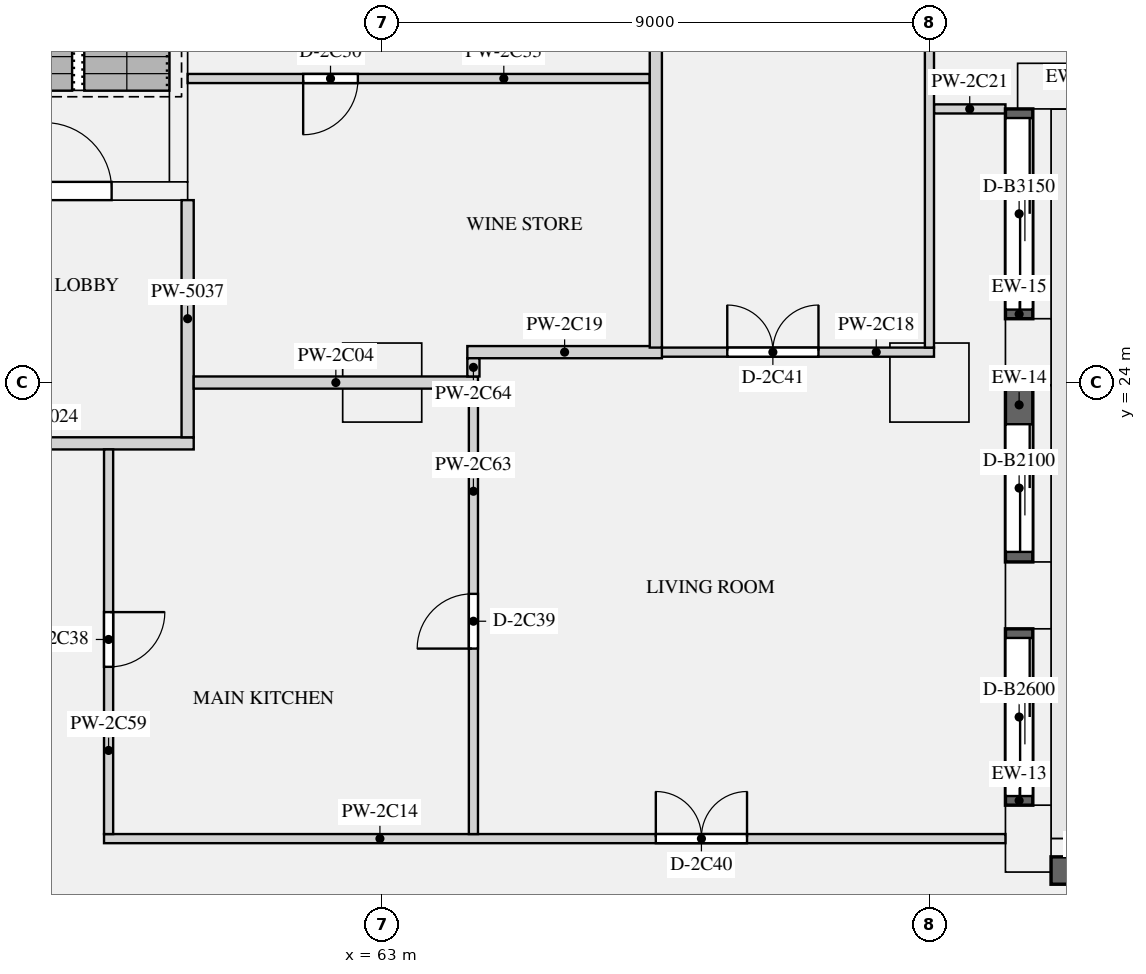
"""IFC4 building model, lengths in metres.
Left out: names, types, materials, properties, quantities, classifications, styles, units other than length and angle.
Written with IfcOpenShell. Run it as: python <this file> out.ifc"""

import sys

from ifc_helpers import new_model, si_unit, direction, frame, frame_2d, origin, origin_2d, place, context, subcontext, project, spatial, rectangle, extrude, element, fill, save


model = new_model("IFC4")
c1 = context("Model", 3, precision=1e-05, world=origin(), true_north=direction((0.0, 1.0)))
c2 = subcontext(c1, "Body", "Model", "MODEL_VIEW")
j1 = project(units=[si_unit("LENGTHUNIT", "METRE"), si_unit("PLANEANGLEUNIT", "RADIAN")], contexts=[c1])
p1 = place(None, origin())
s1 = spatial("IfcSite", under=j1, at=p1, CompositionType="ELEMENT")
p2 = place(p1, origin())
s2 = spatial("IfcBuilding", under=s1, at=p2, CompositionType="ELEMENT")
p3 = place(p2, frame((0.0, 0.0, 102.45)))
s3 = spatial("IfcBuildingStorey", under=s2, at=p3, CompositionType="ELEMENT", Elevation=102.45)
for number, where, z_axis, x_axis in (
    (1, (73.625, 16.5, 0.0), (0.0, 0.0, 1.0), (0.0, 1.0, 0.0)),
    (2, (73.625, 20.5, 0.0), (0.0, 0.0, 1.0), (0.0, 1.0, 0.0)),
    (3, (73.625, 24.5, 0.0), (0.0, 0.0, 1.0), (0.0, 1.0, 0.0)),
    (4, (74.0, 28.875, 0.0), (0.0, 0.0, 1.0), (1.0, 0.0, 0.0)),
):
    element("IfcColumn", number, at=place(p3, frame(where, z_axis=z_axis, x_axis=x_axis)), inside=s3, PredefinedType="USERDEFINED", context=c2, shape_type="SweptSolid", body=[
        extrude(rectangle(XDim=1.1, YDim=0.75, at=origin_2d()), origin(), (0.0, 0.0, 1.0), 3.15),
    ])
for number, where, z_axis, x_axis in (
    (5, (63.0, 24.0, 0.0), (0.0, 0.0, 1.0), (1.0, 0.0, 0.0)),
    (6, (72.0, 24.0, 0.0), (0.0, 0.0, 1.0), (1.0, 0.0, 0.0)),
):
    element("IfcColumn", number, at=place(p3, frame(where, z_axis=z_axis, x_axis=x_axis)), inside=s3, PredefinedType="COLUMN", context=c2, shape_type="SweptSolid", body=[
        extrude(rectangle(XDim=1.3, YDim=1.3, at=origin_2d()), origin(), (0.0, 0.0, 1.0), 3.15),
    ])
p4 = place(p3, frame((56.2, 27.15, 0.0), z_axis=(0.0, 0.0, 1.0), x_axis=(1.0, 0.0, 0.0)))
e7 = element("IfcWall", 7, at=p4, inside=s3, PredefinedType="SHEAR", context=c2, shape_type="SweptSolid", body=[
    extrude(rectangle(XDim=3.6, YDim=0.3, at=frame_2d((1.8, 0.0))), origin(), (0.0, 0.0, 1.0), 3.15),
])
p5 = place(p4, frame((1.25, 0.0, 0.0)))
e8 = element("IfcOpeningElement", 8, at=p5, cuts=e7, PredefinedType="OPENING", context=c2, shape_type="SweptSolid", body=[
    extrude(rectangle(XDim=1.1, YDim=2.1, at=frame_2d((0.55, 1.05))), frame((0.0, 0.16, 0.0), z_axis=(0.0, -1.0, 0.0), x_axis=(1.0, 0.0, 0.0)), (0.0, 0.0, 1.0), 0.32),
])
p6 = place(p3, frame((59.65, 27.3, 0.0), z_axis=(0.0, 0.0, 1.0), x_axis=(0.0, 1.0, 0.0)))
e9 = element("IfcWall", 9, at=p6, inside=s3, PredefinedType="SHEAR", context=c2, shape_type="SweptSolid", body=[
    extrude(rectangle(XDim=7.8, YDim=0.3, at=frame_2d((3.9, 0.0))), origin(), (0.0, 0.0, 1.0), 3.15),
])
p7 = place(p3, frame((75.4, 15.975, 0.9), z_axis=(0.0, 0.0, 1.0), x_axis=(-1.0, 0.0, 0.0)))
e10 = element("IfcWall", 10, at=p7, inside=s3, PredefinedType="SOLIDWALL", context=c2, shape_type="SweptSolid", body=[
    extrude(rectangle(XDim=1.4, YDim=0.45, at=frame_2d((0.7, 0.0))), origin(), (0.0, 0.0, 1.0), 1.93),
])
p8 = place(p3, frame((73.475, 17.05, 0.0), z_axis=(0.0, 0.0, 1.0), x_axis=(0.0, 1.0, 0.0)))
e11 = element("IfcWall", 11, at=p8, inside=s3, PredefinedType="SOLIDWALL", context=c2, shape_type="SweptSolid", body=[
    extrude(rectangle(XDim=2.9, YDim=0.45, at=frame_2d((1.45, 0.0))), origin(), (0.0, 0.0, 1.0), 2.83),
])
p9 = place(p8, frame((0.15, 0.0, 0.0)))
e12 = element("IfcOpeningElement", 12, at=p9, cuts=e11, PredefinedType="OPENING", context=c2, shape_type="SweptSolid", body=[
    extrude(rectangle(XDim=2.6, YDim=2.3, at=frame_2d((1.3, 1.15))), frame((0.0, 0.235, 0.0), z_axis=(0.0, -1.0, 0.0), x_axis=(1.0, 0.0, 0.0)), (0.0, 0.0, 1.0), 0.47),
])
p10 = place(p3, frame((73.475, 21.05, 0.0), z_axis=(0.0, 0.0, 1.0), x_axis=(0.0, 1.0, 0.0)))
e13 = element("IfcWall", 13, at=p10, inside=s3, PredefinedType="SOLIDWALL", context=c2, shape_type="SweptSolid", body=[
    extrude(rectangle(XDim=2.9, YDim=0.45, at=frame_2d((1.45, 0.0))), origin(), (0.0, 0.0, 1.0), 2.83),
])
p11 = place(p10, frame((0.165, 0.0, 0.0)))
e14 = element("IfcOpeningElement", 14, at=p11, cuts=e13, PredefinedType="OPENING", context=c2, shape_type="SweptSolid", body=[
    extrude(rectangle(XDim=2.1, YDim=2.3, at=frame_2d((1.05, 1.15))), frame((0.0, 0.235, 0.0), z_axis=(0.0, -1.0, 0.0), x_axis=(1.0, 0.0, 0.0)), (0.0, 0.0, 1.0), 0.47),
])
p12 = place(p3, frame((73.475, 25.05, 0.0), z_axis=(0.0, 0.0, 1.0), x_axis=(0.0, 1.0, 0.0)))
e15 = element("IfcWall", 15, at=p12, inside=s3, PredefinedType="SOLIDWALL", context=c2, shape_type="SweptSolid", body=[
    extrude(rectangle(XDim=3.45, YDim=0.45, at=frame_2d((1.725, 0.0))), origin(), (0.0, 0.0, 1.0), 2.83),
])
p13 = place(p12, frame((0.15, 0.0, 0.0)))
e16 = element("IfcOpeningElement", 16, at=p13, cuts=e15, PredefinedType="OPENING", context=c2, shape_type="SweptSolid", body=[
    extrude(rectangle(XDim=3.15, YDim=2.3, at=frame_2d((1.575, 1.15))), frame((0.0, 0.235, 0.0), z_axis=(0.0, -1.0, 0.0), x_axis=(1.0, 0.0, 0.0)), (0.0, 0.0, 1.0), 0.47),
])
p14 = place(p3, frame((54.9, 23.0, 0.0), z_axis=(0.0, 0.0, 1.0), x_axis=(1.0, 0.0, 0.0)))
e17 = element("IfcWall", 17, at=p14, inside=s3, PredefinedType="PARTITIONING", context=c2, shape_type="SweptSolid", body=[
    extrude(rectangle(XDim=5.0, YDim=0.2, at=frame_2d((2.5, 0.0))), origin(), (0.0, 0.0, 1.0), 2.83),
])
p15 = place(p3, frame((59.8, 23.1, 0.0), z_axis=(0.0, 0.0, 1.0), x_axis=(0.0, 1.0, 0.0)))
e18 = element("IfcWall", 18, at=p15, inside=s3, PredefinedType="PARTITIONING", context=c2, shape_type="SweptSolid", body=[
    extrude(rectangle(XDim=3.9, YDim=0.2, at=frame_2d((1.95, 0.0))), origin(), (0.0, 0.0, 1.0), 2.83),
])
p16 = place(p3, frame((59.9, 24.0, 0.0), z_axis=(0.0, 0.0, 1.0), x_axis=(1.0, 0.0, 0.0)))
e19 = element("IfcWall", 19, at=p16, inside=s3, PredefinedType="PARTITIONING", context=c2, shape_type="SweptSolid", body=[
    extrude(rectangle(XDim=4.675, YDim=0.2, at=frame_2d((2.337, 0.0))), origin(), (0.0, 0.0, 1.0), 2.83),
])
p17 = place(p3, frame((58.425, 16.5, 0.0), z_axis=(0.0, 0.0, 1.0), x_axis=(1.0, 0.0, 0.0)))
e20 = element("IfcWall", 20, at=p17, inside=s3, PredefinedType="PARTITIONING", context=c2, shape_type="SweptSolid", body=[
    extrude(rectangle(XDim=14.825, YDim=0.15, at=frame_2d((7.413, 0.0))), origin(), (0.0, 0.0, 1.0), 2.83),
])
p18 = place(p17, frame((9.075, 0.0, 0.0)))
e21 = element("IfcOpeningElement", 21, at=p18, cuts=e20, PredefinedType="OPENING", context=c2, shape_type="SweptSolid", body=[
    extrude(rectangle(XDim=1.5, YDim=2.1, at=frame_2d((0.75, 1.05))), frame((0.0, 0.085, 0.0), z_axis=(0.0, -1.0, 0.0), x_axis=(1.0, 0.0, 0.0)), (0.0, 0.0, 1.0), 0.17),
])
p19 = place(p3, frame((67.4, 24.5, 0.0), z_axis=(0.0, 0.0, 1.0), x_axis=(1.0, 0.0, 0.0)))
e22 = element("IfcWall", 22, at=p19, inside=s3, PredefinedType="PARTITIONING", context=c2, shape_type="SweptSolid", body=[
    extrude(rectangle(XDim=4.675, YDim=0.15, at=frame_2d((2.337, 0.0))), origin(), (0.0, 0.0, 1.0), 2.83),
])
p20 = place(p19, frame((1.275, 0.0, 0.0)))
e23 = element("IfcOpeningElement", 23, at=p20, cuts=e22, PredefinedType="OPENING", context=c2, shape_type="SweptSolid", body=[
    extrude(rectangle(XDim=1.5, YDim=2.1, at=frame_2d((0.75, 1.05))), frame((0.0, 0.085, 0.0), z_axis=(0.0, -1.0, 0.0), x_axis=(1.0, 0.0, 0.0)), (0.0, 0.0, 1.0), 0.17),
])
p21 = place(p3, frame((64.4, 24.5, 0.0), z_axis=(0.0, 0.0, 1.0), x_axis=(1.0, 0.0, 0.0)))
e24 = element("IfcWall", 24, at=p21, inside=s3, PredefinedType="PARTITIONING", context=c2, shape_type="SweptSolid", body=[
    extrude(rectangle(XDim=3.2, YDim=0.2, at=frame_2d((1.6, 0.0))), origin(), (0.0, 0.0, 1.0), 2.83),
])
p22 = place(p3, frame((72.075, 28.5, 0.0), z_axis=(0.0, 0.0, 1.0), x_axis=(1.0, 0.0, 0.0)))
e25 = element("IfcWall", 25, at=p22, inside=s3, PredefinedType="PARTITIONING", context=c2, shape_type="SweptSolid", body=[
    extrude(rectangle(XDim=1.175, YDim=0.15, at=frame_2d((0.587, 0.0))), origin(), (0.0, 0.0, 1.0), 2.83),
])
p23 = place(p3, frame((59.8, 29.0, 0.0), z_axis=(0.0, 0.0, 1.0), x_axis=(1.0, 0.0, 0.0)))
e26 = element("IfcWall", 26, at=p23, inside=s3, PredefinedType="PARTITIONING", context=c2, shape_type="SweptSolid", body=[
    extrude(rectangle(XDim=7.6, YDim=0.15, at=frame_2d((3.8, 0.0))), origin(), (0.0, 0.0, 1.0), 2.83),
])
p24 = place(p23, frame((1.9, 0.0, 0.0)))
e27 = element("IfcOpeningElement", 27, at=p24, cuts=e26, PredefinedType="OPENING", context=c2, shape_type="SweptSolid", body=[
    extrude(rectangle(XDim=0.9, YDim=2.1, at=frame_2d((0.45, 1.05))), frame((0.0, 0.085, 0.0), z_axis=(0.0, -1.0, 0.0), x_axis=(1.0, 0.0, 0.0)), (0.0, 0.0, 1.0), 0.17),
])
p25 = place(p3, frame((67.5, 24.575, 0.0), z_axis=(0.0, 0.0, 1.0), x_axis=(0.0, 1.0, 0.0)))
e28 = element("IfcWall", 28, at=p25, inside=s3, PredefinedType="PARTITIONING", context=c2, shape_type="SweptSolid", body=[
    extrude(rectangle(XDim=20.175, YDim=0.2, at=frame_2d((10.087, 0.0))), origin(), (0.0, 0.0, 1.0), 2.83),
])
p26 = place(p3, frame((58.5, 16.575, 0.0), z_axis=(0.0, 0.0, 1.0), x_axis=(0.0, 1.0, 0.0)))
e29 = element("IfcWall", 29, at=p26, inside=s3, PredefinedType="PARTITIONING", context=c2, shape_type="SweptSolid", body=[
    extrude(rectangle(XDim=6.325, YDim=0.15, at=frame_2d((3.163, 0.0))), origin(), (0.0, 0.0, 1.0), 2.83),
])
p27 = place(p26, frame((2.75, 0.0, 0.0)))
e30 = element("IfcOpeningElement", 30, at=p27, cuts=e29, PredefinedType="OPENING", context=c2, shape_type="SweptSolid", body=[
    extrude(rectangle(XDim=0.9, YDim=2.1, at=frame_2d((0.45, 1.05))), frame((0.0, 0.085, 0.0), z_axis=(0.0, -1.0, 0.0), x_axis=(1.0, 0.0, 0.0)), (0.0, 0.0, 1.0), 0.17),
])
p28 = place(p3, frame((64.5, 16.575, 0.0), z_axis=(0.0, 0.0, 1.0), x_axis=(0.0, 1.0, 0.0)))
e31 = element("IfcWall", 31, at=p28, inside=s3, PredefinedType="PARTITIONING", context=c2, shape_type="SweptSolid", body=[
    extrude(rectangle(XDim=7.325, YDim=0.15, at=frame_2d((3.663, 0.0))), origin(), (0.0, 0.0, 1.0), 2.83),
])
p29 = place(p28, frame((3.05, 0.0, 0.0)))
e32 = element("IfcOpeningElement", 32, at=p29, cuts=e31, PredefinedType="OPENING", context=c2, shape_type="SweptSolid", body=[
    extrude(rectangle(XDim=0.9, YDim=2.1, at=frame_2d((0.45, 1.05))), frame((0.0, 0.085, 0.0), z_axis=(0.0, -1.0, 0.0), x_axis=(1.0, 0.0, 0.0)), (0.0, 0.0, 1.0), 0.17),
])
p30 = place(p3, frame((64.5, 24.1, 0.0), z_axis=(0.0, 0.0, 1.0), x_axis=(0.0, 1.0, 0.0)))
e33 = element("IfcWall", 33, at=p30, inside=s3, PredefinedType="PARTITIONING", context=c2, shape_type="SweptSolid", body=[
    extrude(rectangle(XDim=0.3, YDim=0.2, at=frame_2d((0.15, 0.0))), origin(), (0.0, 0.0, 1.0), 2.83),
])
p31 = place(p3, frame((72.0, 24.575, 0.0), z_axis=(0.0, 0.0, 1.0), x_axis=(0.0, 1.0, 0.0)))
e34 = element("IfcWall", 34, at=p31, inside=s3, PredefinedType="PARTITIONING", context=c2, shape_type="SweptSolid", body=[
    extrude(rectangle(XDim=15.675, YDim=0.15, at=frame_2d((7.837, 0.0))), origin(), (0.0, 0.0, 1.0), 2.83),
])
p32 = place(p31, frame((6.65, 0.0, 0.0)))
e35 = element("IfcOpeningElement", 35, at=p32, cuts=e34, PredefinedType="OPENING", context=c2, shape_type="SweptSolid", body=[
    extrude(rectangle(XDim=0.9, YDim=2.1, at=frame_2d((0.45, 1.05))), frame((0.0, 0.085, 0.0), z_axis=(0.0, -1.0, 0.0), x_axis=(1.0, 0.0, 0.0)), (0.0, 0.0, 1.0), 0.17),
])
p33 = place(p9, origin())
e36 = element("IfcDoor", 36, at=p33, inside=s3, OperationType="SLIDING_TO_LEFT", PredefinedType="DOOR", context=c2, shape_type="SweptSolid", body=[
    extrude(rectangle(XDim=2.6, YDim=2.3, at=frame_2d((1.3, 1.15))), frame((0.0, -0.07, 0.0), z_axis=(0.0, -1.0, 0.0), x_axis=(1.0, 0.0, 0.0)), (0.0, 0.0, 1.0), 0.05),
])
fill(e12, e36)
p34 = place(p11, origin())
e37 = element("IfcDoor", 37, at=p34, inside=s3, OperationType="SLIDING_TO_LEFT", PredefinedType="DOOR", context=c2, shape_type="SweptSolid", body=[
    extrude(rectangle(XDim=2.1, YDim=2.3, at=frame_2d((1.05, 1.15))), frame((0.0, -0.07, 0.0), z_axis=(0.0, -1.0, 0.0), x_axis=(1.0, 0.0, 0.0)), (0.0, 0.0, 1.0), 0.05),
])
fill(e14, e37)
p35 = place(p13, origin())
e38 = element("IfcDoor", 38, at=p35, inside=s3, OperationType="SLIDING_TO_LEFT", PredefinedType="DOOR", context=c2, shape_type="SweptSolid", body=[
    extrude(rectangle(XDim=3.15, YDim=2.3, at=frame_2d((1.575, 1.15))), frame((0.0, -0.07, 0.0), z_axis=(0.0, -1.0, 0.0), x_axis=(1.0, 0.0, 0.0)), (0.0, 0.0, 1.0), 0.05),
])
fill(e16, e38)
p36 = place(p5, origin())
e39 = element("IfcDoor", 39, at=p36, inside=s3, OperationType="SINGLE_SWING_LEFT", PredefinedType="DOOR", context=c2, shape_type="SweptSolid", body=[
    extrude(rectangle(XDim=1.1, YDim=2.1, at=frame_2d((0.55, 1.05))), frame((0.0, 0.025, 0.0), z_axis=(0.0, -1.0, 0.0), x_axis=(1.0, 0.0, 0.0)), (0.0, 0.0, 1.0), 0.05),
])
fill(e8, e39)
p37 = place(p24, frame((0.9, 0.0, 0.0), z_axis=(0.0, 0.0, 1.0), x_axis=(-1.0, 0.0, 0.0)))
e40 = element("IfcDoor", 40, at=p37, inside=s3, OperationType="SINGLE_SWING_RIGHT", PredefinedType="DOOR", context=c2, shape_type="SweptSolid", body=[
    extrude(rectangle(XDim=0.9, YDim=2.1, at=frame_2d((0.45, 1.05))), frame((0.0, 0.025, 0.0), z_axis=(0.0, -1.0, 0.0), x_axis=(1.0, 0.0, 0.0)), (0.0, 0.0, 1.0), 0.05),
])
fill(e27, e40)
p38 = place(p27, frame((0.9, 0.0, 0.0), z_axis=(0.0, 0.0, 1.0), x_axis=(-1.0, 0.0, 0.0)))
e41 = element("IfcDoor", 41, at=p38, inside=s3, OperationType="SINGLE_SWING_LEFT", PredefinedType="DOOR", context=c2, shape_type="SweptSolid", body=[
    extrude(rectangle(XDim=0.9, YDim=2.1, at=frame_2d((0.45, 1.05))), frame((0.0, 0.025, 0.0), z_axis=(0.0, -1.0, 0.0), x_axis=(1.0, 0.0, 0.0)), (0.0, 0.0, 1.0), 0.05),
])
fill(e30, e41)
p39 = place(p29, origin())
e42 = element("IfcDoor", 42, at=p39, inside=s3, OperationType="SINGLE_SWING_LEFT", PredefinedType="DOOR", context=c2, shape_type="SweptSolid", body=[
    extrude(rectangle(XDim=0.9, YDim=2.1, at=frame_2d((0.45, 1.05))), frame((0.0, 0.025, 0.0), z_axis=(0.0, -1.0, 0.0), x_axis=(1.0, 0.0, 0.0)), (0.0, 0.0, 1.0), 0.05),
])
fill(e32, e42)
p40 = place(p18, origin())
e43 = element("IfcDoor", 43, at=p40, inside=s3, OperationType="DOUBLE_DOOR_SINGLE_SWING", PredefinedType="DOOR", context=c2, shape_type="SweptSolid", body=[
    extrude(rectangle(XDim=1.5, YDim=2.1, at=frame_2d((0.75, 1.05))), frame((0.0, 0.025, 0.0), z_axis=(0.0, -1.0, 0.0), x_axis=(1.0, 0.0, 0.0)), (0.0, 0.0, 1.0), 0.05),
])
fill(e21, e43)
p41 = place(p20, origin())
e44 = element("IfcDoor", 44, at=p41, inside=s3, OperationType="DOUBLE_DOOR_SINGLE_SWING", PredefinedType="DOOR", context=c2, shape_type="SweptSolid", body=[
    extrude(rectangle(XDim=1.5, YDim=2.1, at=frame_2d((0.75, 1.05))), frame((0.0, 0.025, 0.0), z_axis=(0.0, -1.0, 0.0), x_axis=(1.0, 0.0, 0.0)), (0.0, 0.0, 1.0), 0.05),
])
fill(e23, e44)
save(model, sys.argv[1])
